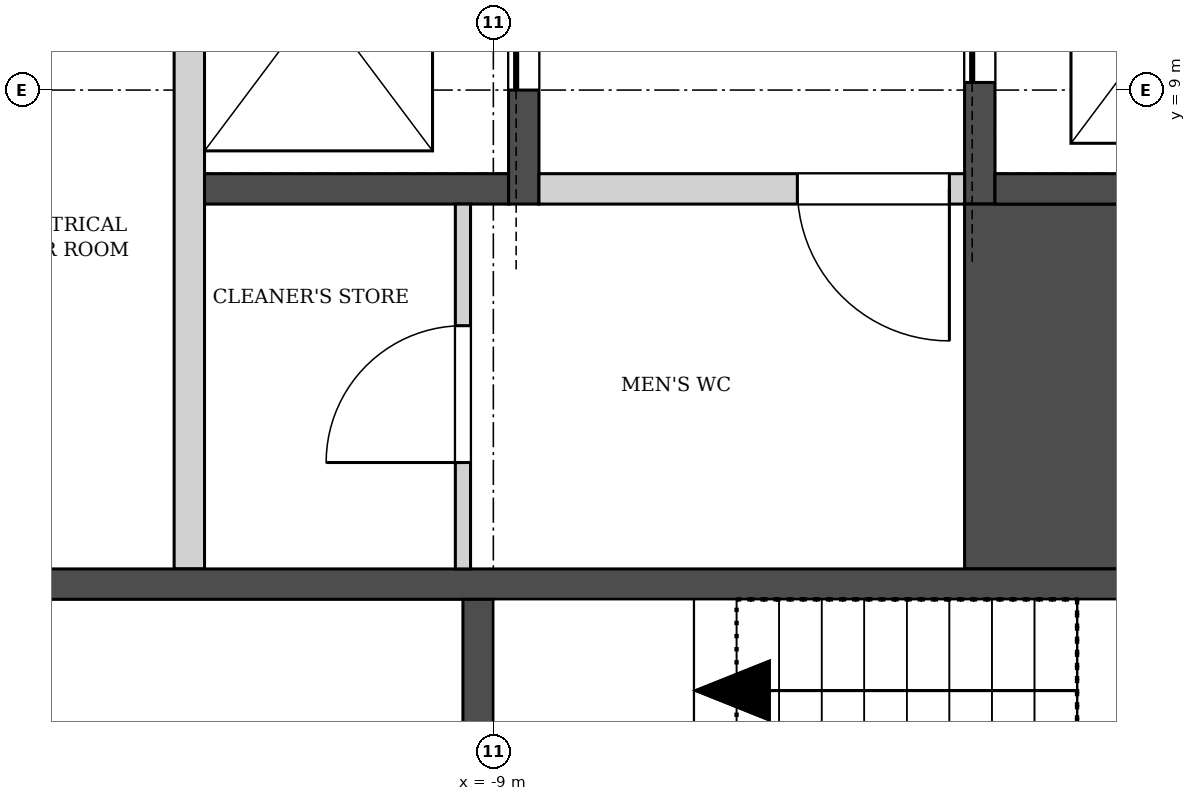
"""IFC4 building model, lengths in metres.
Left out: names, types, materials, properties, quantities, classifications, styles, units other than length and angle.
Written with IfcOpenShell. Run it as: python <this file> out.ifc"""

import sys

from ifc_helpers import new_model, si_unit, direction, frame, frame_2d, origin, place, context, subcontext, project, spatial, rectangle, extrude, element, fill, save


model = new_model("IFC4")
c1 = context("Model", 3, precision=1e-05, world=origin(), true_north=direction((0.0, 1.0)))
c2 = subcontext(c1, "Body", "Model", "MODEL_VIEW")
j1 = project(units=[si_unit("LENGTHUNIT", "METRE"), si_unit("PLANEANGLEUNIT", "RADIAN")], contexts=[c1])
p1 = place(None, origin())
s1 = spatial("IfcSite", under=j1, at=p1, CompositionType="ELEMENT")
p2 = place(p1, origin())
s2 = spatial("IfcBuilding", under=s1, at=p2, CompositionType="ELEMENT")
p3 = place(p2, frame((0.0, 0.0, 14.0)))
s3 = spatial("IfcBuildingStorey", under=s2, at=p3, CompositionType="ELEMENT", Elevation=14.0)
p4 = place(p3, frame((-4.853, 74.393, 0.0), z_axis=(0.0, 0.0, 1.0), x_axis=(-0.49999894854, -0.866026010844, 0.0)))
e1 = element("IfcWall", 1, at=p4, inside=s3, PredefinedType="SOLIDWALL", context=c2, shape_type="SweptSolid", body=[
    extrude(rectangle(XDim=76.0, YDim=0.34, at=frame_2d((38.0, 0.0))), origin(), (0.0, 0.0, 1.0), 5.7),
])
p5 = place(p4, frame((1.058, 0.0, 0.9)))
e2 = element("IfcOpeningElement", 2, at=p5, cuts=e1, PredefinedType="OPENING", context=c2, shape_type="SweptSolid", body=[
    extrude(rectangle(XDim=1.885, YDim=3.5, at=frame_2d((0.942, 1.75))), frame((0.0, 0.18, 0.0), z_axis=(0.0, -1.0, 0.0), x_axis=(1.0, 0.0, 0.0)), (0.0, 0.0, 1.0), 0.36),
])
p6 = place(p4, frame((4.058, 0.0, 0.9)))
e3 = element("IfcOpeningElement", 3, at=p6, cuts=e1, PredefinedType="OPENING", context=c2, shape_type="SweptSolid", body=[
    extrude(rectangle(XDim=1.885, YDim=3.5, at=frame_2d((0.942, 1.75))), frame((0.0, 0.18, 0.0), z_axis=(0.0, -1.0, 0.0), x_axis=(1.0, 0.0, 0.0)), (0.0, 0.0, 1.0), 0.36),
])
p7 = place(p4, frame((7.058, 0.0, 0.9)))
e4 = element("IfcOpeningElement", 4, at=p7, cuts=e1, PredefinedType="OPENING", context=c2, shape_type="SweptSolid", body=[
    extrude(rectangle(XDim=1.885, YDim=3.5, at=frame_2d((0.942, 1.75))), frame((0.0, 0.18, 0.0), z_axis=(0.0, -1.0, 0.0), x_axis=(1.0, 0.0, 0.0)), (0.0, 0.0, 1.0), 0.36),
])
p8 = place(p4, frame((10.058, 0.0, 0.9)))
e5 = element("IfcOpeningElement", 5, at=p8, cuts=e1, PredefinedType="OPENING", context=c2, shape_type="SweptSolid", body=[
    extrude(rectangle(XDim=1.885, YDim=3.5, at=frame_2d((0.942, 1.75))), frame((0.0, 0.18, 0.0), z_axis=(0.0, -1.0, 0.0), x_axis=(1.0, 0.0, 0.0)), (0.0, 0.0, 1.0), 0.36),
])
p9 = place(p4, frame((13.058, 0.0, 0.9)))
e6 = element("IfcOpeningElement", 6, at=p9, cuts=e1, PredefinedType="OPENING", context=c2, shape_type="SweptSolid", body=[
    extrude(rectangle(XDim=1.885, YDim=3.5, at=frame_2d((0.942, 1.75))), frame((0.0, 0.18, 0.0), z_axis=(0.0, -1.0, 0.0), x_axis=(1.0, 0.0, 0.0)), (0.0, 0.0, 1.0), 0.36),
])
p10 = place(p4, frame((16.058, 0.0, 0.9)))
e7 = element("IfcOpeningElement", 7, at=p10, cuts=e1, PredefinedType="OPENING", context=c2, shape_type="SweptSolid", body=[
    extrude(rectangle(XDim=1.885, YDim=3.5, at=frame_2d((0.942, 1.75))), frame((0.0, 0.18, 0.0), z_axis=(0.0, -1.0, 0.0), x_axis=(1.0, 0.0, 0.0)), (0.0, 0.0, 1.0), 0.36),
])
p11 = place(p4, frame((19.058, 0.0, 0.9)))
e8 = element("IfcOpeningElement", 8, at=p11, cuts=e1, PredefinedType="OPENING", context=c2, shape_type="SweptSolid", body=[
    extrude(rectangle(XDim=1.885, YDim=3.5, at=frame_2d((0.942, 1.75))), frame((0.0, 0.18, 0.0), z_axis=(0.0, -1.0, 0.0), x_axis=(1.0, 0.0, 0.0)), (0.0, 0.0, 1.0), 0.36),
])
p12 = place(p4, frame((22.058, 0.0, 0.9)))
e9 = element("IfcOpeningElement", 9, at=p12, cuts=e1, PredefinedType="OPENING", context=c2, shape_type="SweptSolid", body=[
    extrude(rectangle(XDim=1.885, YDim=3.5, at=frame_2d((0.942, 1.75))), frame((0.0, 0.18, 0.0), z_axis=(0.0, -1.0, 0.0), x_axis=(1.0, 0.0, 0.0)), (0.0, 0.0, 1.0), 0.36),
])
p13 = place(p4, frame((25.058, 0.0, 0.9)))
e10 = element("IfcOpeningElement", 10, at=p13, cuts=e1, PredefinedType="OPENING", context=c2, shape_type="SweptSolid", body=[
    extrude(rectangle(XDim=1.885, YDim=3.5, at=frame_2d((0.942, 1.75))), frame((0.0, 0.18, 0.0), z_axis=(0.0, -1.0, 0.0), x_axis=(1.0, 0.0, 0.0)), (0.0, 0.0, 1.0), 0.36),
])
p14 = place(p4, frame((28.058, 0.0, 0.9)))
e11 = element("IfcOpeningElement", 11, at=p14, cuts=e1, PredefinedType="OPENING", context=c2, shape_type="SweptSolid", body=[
    extrude(rectangle(XDim=1.885, YDim=3.5, at=frame_2d((0.942, 1.75))), frame((0.0, 0.18, 0.0), z_axis=(0.0, -1.0, 0.0), x_axis=(1.0, 0.0, 0.0)), (0.0, 0.0, 1.0), 0.36),
])
p15 = place(p4, frame((31.058, 0.0, 0.9)))
e12 = element("IfcOpeningElement", 12, at=p15, cuts=e1, PredefinedType="OPENING", context=c2, shape_type="SweptSolid", body=[
    extrude(rectangle(XDim=1.885, YDim=3.5, at=frame_2d((0.942, 1.75))), frame((0.0, 0.18, 0.0), z_axis=(0.0, -1.0, 0.0), x_axis=(1.0, 0.0, 0.0)), (0.0, 0.0, 1.0), 0.36),
])
p16 = place(p4, frame((34.058, 0.0, 0.9)))
e13 = element("IfcOpeningElement", 13, at=p16, cuts=e1, PredefinedType="OPENING", context=c2, shape_type="SweptSolid", body=[
    extrude(rectangle(XDim=1.885, YDim=3.5, at=frame_2d((0.942, 1.75))), frame((0.0, 0.18, 0.0), z_axis=(0.0, -1.0, 0.0), x_axis=(1.0, 0.0, 0.0)), (0.0, 0.0, 1.0), 0.36),
])
p17 = place(p4, frame((37.058, 0.0, 0.9)))
e14 = element("IfcOpeningElement", 14, at=p17, cuts=e1, PredefinedType="OPENING", context=c2, shape_type="SweptSolid", body=[
    extrude(rectangle(XDim=1.885, YDim=3.5, at=frame_2d((0.942, 1.75))), frame((0.0, 0.18, 0.0), z_axis=(0.0, -1.0, 0.0), x_axis=(1.0, 0.0, 0.0)), (0.0, 0.0, 1.0), 0.36),
])
p18 = place(p4, frame((40.058, 0.0, 0.9)))
e15 = element("IfcOpeningElement", 15, at=p18, cuts=e1, PredefinedType="OPENING", context=c2, shape_type="SweptSolid", body=[
    extrude(rectangle(XDim=1.885, YDim=3.5, at=frame_2d((0.942, 1.75))), frame((0.0, 0.18, 0.0), z_axis=(0.0, -1.0, 0.0), x_axis=(1.0, 0.0, 0.0)), (0.0, 0.0, 1.0), 0.36),
])
p19 = place(p4, frame((43.058, 0.0, 0.9)))
e16 = element("IfcOpeningElement", 16, at=p19, cuts=e1, PredefinedType="OPENING", context=c2, shape_type="SweptSolid", body=[
    extrude(rectangle(XDim=1.885, YDim=3.5, at=frame_2d((0.942, 1.75))), frame((0.0, 0.18, 0.0), z_axis=(0.0, -1.0, 0.0), x_axis=(1.0, 0.0, 0.0)), (0.0, 0.0, 1.0), 0.36),
])
p20 = place(p4, frame((46.058, 0.0, 0.9)))
e17 = element("IfcOpeningElement", 17, at=p20, cuts=e1, PredefinedType="OPENING", context=c2, shape_type="SweptSolid", body=[
    extrude(rectangle(XDim=1.885, YDim=3.5, at=frame_2d((0.942, 1.75))), frame((0.0, 0.18, 0.0), z_axis=(0.0, -1.0, 0.0), x_axis=(1.0, 0.0, 0.0)), (0.0, 0.0, 1.0), 0.36),
])
p21 = place(p4, frame((49.058, 0.0, 0.9)))
e18 = element("IfcOpeningElement", 18, at=p21, cuts=e1, PredefinedType="OPENING", context=c2, shape_type="SweptSolid", body=[
    extrude(rectangle(XDim=1.885, YDim=3.5, at=frame_2d((0.942, 1.75))), frame((0.0, 0.18, 0.0), z_axis=(0.0, -1.0, 0.0), x_axis=(1.0, 0.0, 0.0)), (0.0, 0.0, 1.0), 0.36),
])
p22 = place(p4, frame((52.058, 0.0, 0.9)))
e19 = element("IfcOpeningElement", 19, at=p22, cuts=e1, PredefinedType="OPENING", context=c2, shape_type="SweptSolid", body=[
    extrude(rectangle(XDim=1.885, YDim=3.5, at=frame_2d((0.942, 1.75))), frame((0.0, 0.18, 0.0), z_axis=(0.0, -1.0, 0.0), x_axis=(1.0, 0.0, 0.0)), (0.0, 0.0, 1.0), 0.36),
])
p23 = place(p4, frame((55.058, 0.0, 0.9)))
e20 = element("IfcOpeningElement", 20, at=p23, cuts=e1, PredefinedType="OPENING", context=c2, shape_type="SweptSolid", body=[
    extrude(rectangle(XDim=1.885, YDim=3.5, at=frame_2d((0.942, 1.75))), frame((0.0, 0.18, 0.0), z_axis=(0.0, -1.0, 0.0), x_axis=(1.0, 0.0, 0.0)), (0.0, 0.0, 1.0), 0.36),
])
p24 = place(p4, frame((58.058, 0.0, 0.9)))
e21 = element("IfcOpeningElement", 21, at=p24, cuts=e1, PredefinedType="OPENING", context=c2, shape_type="SweptSolid", body=[
    extrude(rectangle(XDim=1.885, YDim=3.5, at=frame_2d((0.942, 1.75))), frame((0.0, 0.18, 0.0), z_axis=(0.0, -1.0, 0.0), x_axis=(1.0, 0.0, 0.0)), (0.0, 0.0, 1.0), 0.36),
])
p25 = place(p4, frame((61.058, 0.0, 0.9)))
e22 = element("IfcOpeningElement", 22, at=p25, cuts=e1, PredefinedType="OPENING", context=c2, shape_type="SweptSolid", body=[
    extrude(rectangle(XDim=1.885, YDim=3.5, at=frame_2d((0.942, 1.75))), frame((0.0, 0.18, 0.0), z_axis=(0.0, -1.0, 0.0), x_axis=(1.0, 0.0, 0.0)), (0.0, 0.0, 1.0), 0.36),
])
p26 = place(p4, frame((64.058, 0.0, 0.9)))
e23 = element("IfcOpeningElement", 23, at=p26, cuts=e1, PredefinedType="OPENING", context=c2, shape_type="SweptSolid", body=[
    extrude(rectangle(XDim=1.885, YDim=3.5, at=frame_2d((0.942, 1.75))), frame((0.0, 0.18, 0.0), z_axis=(0.0, -1.0, 0.0), x_axis=(1.0, 0.0, 0.0)), (0.0, 0.0, 1.0), 0.36),
])
p27 = place(p4, frame((67.058, 0.0, 0.9)))
e24 = element("IfcOpeningElement", 24, at=p27, cuts=e1, PredefinedType="OPENING", context=c2, shape_type="SweptSolid", body=[
    extrude(rectangle(XDim=1.885, YDim=3.5, at=frame_2d((0.942, 1.75))), frame((0.0, 0.18, 0.0), z_axis=(0.0, -1.0, 0.0), x_axis=(1.0, 0.0, 0.0)), (0.0, 0.0, 1.0), 0.36),
])
p28 = place(p4, frame((70.058, 0.0, 0.9)))
e25 = element("IfcOpeningElement", 25, at=p28, cuts=e1, PredefinedType="OPENING", context=c2, shape_type="SweptSolid", body=[
    extrude(rectangle(XDim=1.885, YDim=3.5, at=frame_2d((0.942, 1.75))), frame((0.0, 0.18, 0.0), z_axis=(0.0, -1.0, 0.0), x_axis=(1.0, 0.0, 0.0)), (0.0, 0.0, 1.0), 0.36),
])
p29 = place(p4, frame((73.058, 0.0, 0.9)))
e26 = element("IfcOpeningElement", 26, at=p29, cuts=e1, PredefinedType="OPENING", context=c2, shape_type="SweptSolid", body=[
    extrude(rectangle(XDim=1.885, YDim=3.5, at=frame_2d((0.942, 1.75))), frame((0.0, 0.18, 0.0), z_axis=(0.0, -1.0, 0.0), x_axis=(1.0, 0.0, 0.0)), (0.0, 0.0, 1.0), 0.36),
])
p30 = place(p3, frame((-11.0, 5.85, 0.0), z_axis=(0.0, 0.0, 1.0), x_axis=(0.0, 1.0, 0.0)))
e27 = element("IfcWall", 27, at=p30, inside=s3, PredefinedType="SOLIDWALL", context=c2, shape_type="SweptSolid", body=[
    extrude(rectangle(XDim=7.4, YDim=0.2, at=frame_2d((3.7, 0.0))), origin(), (0.0, 0.0, 1.0), 5.7),
])
p31 = place(p3, frame((-8.8, 8.25, -0.3), z_axis=(0.0, 0.0, 1.0), x_axis=(0.0, 1.0, 0.0)))
e28 = element("IfcWall", 28, at=p31, inside=s3, PredefinedType="SOLIDWALL", context=c2, shape_type="SweptSolid", body=[
    extrude(rectangle(XDim=5.2, YDim=0.2, at=frame_2d((2.6, 0.0))), origin(), (0.0, 0.0, 1.0), 6.0),
])
p32 = place(p31, frame((0.75, 0.0, 0.3)))
e29 = element("IfcOpeningElement", 29, at=p32, cuts=e28, PredefinedType="OPENING", context=c2, shape_type="SweptSolid", body=[
    extrude(rectangle(XDim=1.2, YDim=2.1, at=frame_2d((0.6, 1.05))), frame((0.0, 0.11, 0.0), z_axis=(0.0, -1.0, 0.0), x_axis=(1.0, 0.0, 0.0)), (0.0, 0.0, 1.0), 0.22),
])
p33 = place(p31, frame((3.25, 0.0, 0.3)))
e30 = element("IfcOpeningElement", 30, at=p33, cuts=e28, PredefinedType="OPENING", context=c2, shape_type="SweptSolid", body=[
    extrude(rectangle(XDim=1.2, YDim=2.1, at=frame_2d((0.6, 1.05))), frame((0.0, 0.11, 0.0), z_axis=(0.0, -1.0, 0.0), x_axis=(1.0, 0.0, 0.0)), (0.0, 0.0, 1.0), 0.22),
])
p34 = place(p3, frame((-5.8, 8.25, -0.3), z_axis=(0.0, 0.0, 1.0), x_axis=(0.0, 1.0, 0.0)))
e31 = element("IfcWall", 31, at=p34, inside=s3, PredefinedType="SOLIDWALL", context=c2, shape_type="SweptSolid", body=[
    extrude(rectangle(XDim=8.0, YDim=0.2, at=frame_2d((4.0, 0.0))), origin(), (0.0, 0.0, 1.0), 6.0),
])
p35 = place(p34, frame((0.8, 0.0, 0.3)))
e32 = element("IfcOpeningElement", 32, at=p35, cuts=e31, PredefinedType="OPENING", context=c2, shape_type="SweptSolid", body=[
    extrude(rectangle(XDim=1.2, YDim=2.1, at=frame_2d((0.6, 1.05))), frame((0.0, 0.11, 0.0), z_axis=(0.0, -1.0, 0.0), x_axis=(1.0, 0.0, 0.0)), (0.0, 0.0, 1.0), 0.22),
])
p36 = place(p34, frame((3.4, 0.0, 0.3)))
e33 = element("IfcOpeningElement", 33, at=p36, cuts=e31, PredefinedType="OPENING", context=c2, shape_type="SweptSolid", body=[
    extrude(rectangle(XDim=1.2, YDim=2.1, at=frame_2d((0.6, 1.05))), frame((0.0, 0.11, 0.0), z_axis=(0.0, -1.0, 0.0), x_axis=(1.0, 0.0, 0.0)), (0.0, 0.0, 1.0), 0.22),
])
p37 = place(p34, frame((6.0, 0.0, 0.3)))
e34 = element("IfcOpeningElement", 34, at=p37, cuts=e31, PredefinedType="OPENING", context=c2, shape_type="SweptSolid", body=[
    extrude(rectangle(XDim=1.2, YDim=2.1, at=frame_2d((0.6, 1.05))), frame((0.0, 0.11, 0.0), z_axis=(0.0, -1.0, 0.0), x_axis=(1.0, 0.0, 0.0)), (0.0, 0.0, 1.0), 0.22),
])
p38 = place(p3, frame((-5.2, 5.85, -0.3), z_axis=(0.0, 0.0, 1.0), x_axis=(0.0, 1.0, 0.0)))
e35 = element("IfcWall", 35, at=p38, inside=s3, PredefinedType="SOLIDWALL", context=c2, shape_type="SweptSolid", body=[
    extrude(rectangle(XDim=2.4, YDim=1.4, at=frame_2d((1.2, 0.0))), origin(), (0.0, 0.0, 1.0), 6.0),
])
p39 = place(p3, frame((-10.9, 8.35, -0.3), z_axis=(0.0, 0.0, 1.0), x_axis=(1.0, 0.0, 0.0)))
e36 = element("IfcWall", 36, at=p39, inside=s3, PredefinedType="SOLIDWALL", context=c2, shape_type="SweptSolid", body=[
    extrude(rectangle(XDim=2.0, YDim=0.2, at=frame_2d((1.0, 0.0))), origin(), (0.0, 0.0, 1.0), 6.0),
])
p40 = place(p3, frame((-5.7, 8.35, -0.3), z_axis=(0.0, 0.0, 1.0), x_axis=(1.0, 0.0, 0.0)))
e37 = element("IfcWall", 37, at=p40, inside=s3, PredefinedType="SOLIDWALL", context=c2, shape_type="SweptSolid", body=[
    extrude(rectangle(XDim=4.2, YDim=0.2, at=frame_2d((2.1, 0.0))), origin(), (0.0, 0.0, 1.0), 6.0),
])
p41 = place(p3, frame((-12.6, 5.75, -0.3), z_axis=(0.0, 0.0, 1.0), x_axis=(1.0, 0.0, 0.0)))
e38 = element("IfcWall", 38, at=p41, inside=s3, PredefinedType="SOLIDWALL", context=c2, shape_type="SweptSolid", body=[
    extrude(rectangle(XDim=11.4, YDim=0.2, at=frame_2d((5.7, 0.0))), origin(), (0.0, 0.0, 1.0), 6.0),
])
p42 = place(p3, frame((-9.1, 2.25, -0.3), z_axis=(0.0, 0.0, 1.0), x_axis=(0.0, 1.0, 0.0)))
e39 = element("IfcWall", 39, at=p42, inside=s3, PredefinedType="SOLIDWALL", context=c2, shape_type="SweptSolid", body=[
    extrude(rectangle(XDim=3.4, YDim=0.2, at=frame_2d((1.7, 0.0))), origin(), (0.0, 0.0, 1.0), 6.0),
])
p43 = place(p42, frame((0.2, 0.0, 0.3)))
e40 = element("IfcOpeningElement", 40, at=p43, cuts=e39, PredefinedType="OPENING", context=c2, shape_type="SweptSolid", body=[
    extrude(rectangle(XDim=1.2, YDim=2.1, at=frame_2d((0.6, 1.05))), frame((0.0, 0.11, 0.0), z_axis=(0.0, -1.0, 0.0), x_axis=(1.0, 0.0, 0.0)), (0.0, 0.0, 1.0), 0.22),
])
p44 = place(p3, frame((-9.2, 5.85, 0.0), z_axis=(0.0, 0.0, 1.0), x_axis=(0.0, 1.0, 0.0)))
e41 = element("IfcWall", 41, at=p44, inside=s3, PredefinedType="PARTITIONING", context=c2, shape_type="SweptSolid", body=[
    extrude(rectangle(XDim=2.4, YDim=0.1, at=frame_2d((1.2, 0.0))), origin(), (0.0, 0.0, 1.0), 5.7),
])
p45 = place(p44, frame((0.7, 0.0, 0.0)))
e42 = element("IfcOpeningElement", 42, at=p45, cuts=e41, PredefinedType="OPENING", context=c2, shape_type="SweptSolid", body=[
    extrude(rectangle(XDim=0.9, YDim=2.1, at=frame_2d((0.45, 1.05))), frame((0.0, 0.06, 0.0), z_axis=(0.0, -1.0, 0.0), x_axis=(1.0, 0.0, 0.0)), (0.0, 0.0, 1.0), 0.12),
])
p46 = place(p3, frame((-8.7, 8.35, 0.0), z_axis=(0.0, 0.0, 1.0), x_axis=(1.0, 0.0, 0.0)))
e43 = element("IfcWall", 43, at=p46, inside=s3, PredefinedType="SOLIDWALL", context=c2, shape_type="SweptSolid", body=[
    extrude(rectangle(XDim=2.8, YDim=0.2, at=frame_2d((1.4, 0.0))), origin(), (0.0, 0.0, 1.0), 5.7),
])
p47 = place(p46, frame((1.7, 0.0, 0.0)))
e44 = element("IfcOpeningElement", 44, at=p47, cuts=e43, PredefinedType="OPENING", context=c2, shape_type="SweptSolid", body=[
    extrude(rectangle(XDim=1.0, YDim=2.1, at=frame_2d((0.5, 1.05))), frame((0.0, 0.11, 0.0), z_axis=(0.0, -1.0, 0.0), x_axis=(1.0, 0.0, 0.0)), (0.0, 0.0, 1.0), 0.22),
])
p48 = place(p32, origin())
e45 = element("IfcDoor", 45, at=p48, inside=s3, OperationType="SLIDING_TO_LEFT", PredefinedType="DOOR", context=c2, shape_type="SweptSolid", body=[
    extrude(rectangle(XDim=1.2, YDim=2.1, at=frame_2d((0.6, 1.05))), frame((0.0, 0.025, 0.0), z_axis=(0.0, -1.0, 0.0), x_axis=(1.0, 0.0, 0.0)), (0.0, 0.0, 1.0), 0.05),
])
fill(e29, e45)
p49 = place(p35, origin())
e46 = element("IfcDoor", 46, at=p49, inside=s3, OperationType="SLIDING_TO_LEFT", PredefinedType="DOOR", context=c2, shape_type="SweptSolid", body=[
    extrude(rectangle(XDim=1.2, YDim=2.1, at=frame_2d((0.6, 1.05))), frame((0.0, 0.025, 0.0), z_axis=(0.0, -1.0, 0.0), x_axis=(1.0, 0.0, 0.0)), (0.0, 0.0, 1.0), 0.05),
])
fill(e32, e46)
p50 = place(p47, frame((1.0, 0.0, 0.0), z_axis=(0.0, 0.0, 1.0), x_axis=(-1.0, 0.0, 0.0)))
e47 = element("IfcDoor", 47, at=p50, inside=s3, OperationType="SINGLE_SWING_LEFT", PredefinedType="DOOR", context=c2, shape_type="SweptSolid", body=[
    extrude(rectangle(XDim=1.0, YDim=2.1, at=frame_2d((0.5, 1.05))), frame((0.0, 0.025, 0.0), z_axis=(0.0, -1.0, 0.0), x_axis=(1.0, 0.0, 0.0)), (0.0, 0.0, 1.0), 0.05),
])
fill(e44, e47)
p51 = place(p45, origin())
e48 = element("IfcDoor", 48, at=p51, inside=s3, OperationType="SINGLE_SWING_LEFT", PredefinedType="DOOR", context=c2, shape_type="SweptSolid", body=[
    extrude(rectangle(XDim=0.9, YDim=2.1, at=frame_2d((0.45, 1.05))), frame((0.0, 0.025, 0.0), z_axis=(0.0, -1.0, 0.0), x_axis=(1.0, 0.0, 0.0)), (0.0, 0.0, 1.0), 0.05),
])
fill(e42, e48)
save(model, sys.argv[1])
